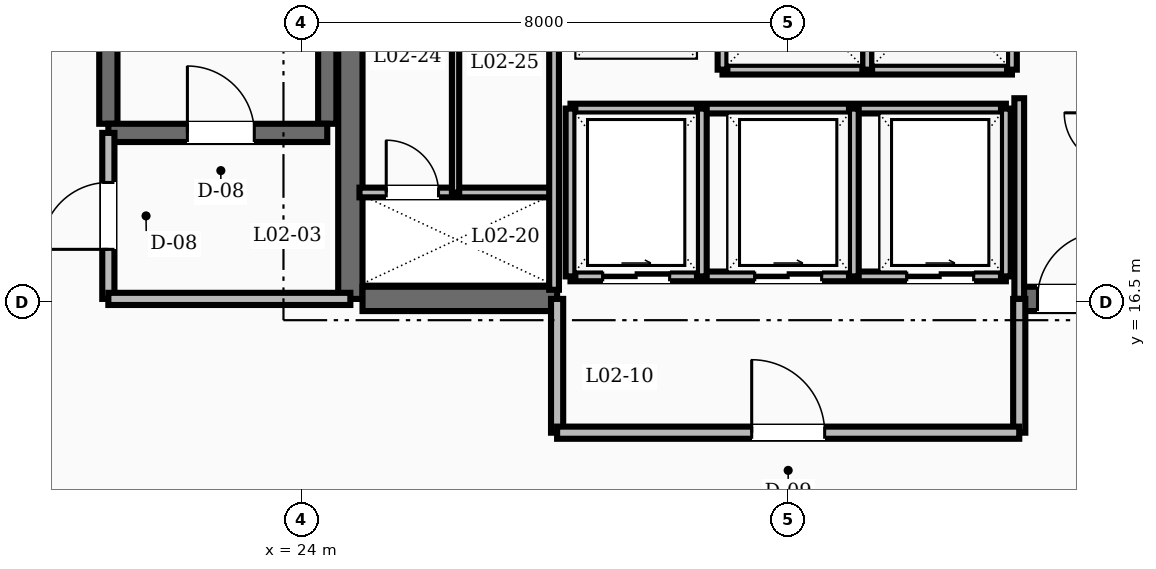
"""IFC4 building model, lengths in metres.
Left out: names, types, materials, properties, quantities, classifications, styles, units other than length and angle.
Written with IfcOpenShell. Run it as: python <this file> out.ifc"""

import sys

from ifc_helpers import new_model, si_unit, direction, frame, frame_2d, origin, place, context, subcontext, project, spatial, rectangle, extrude, element, fill, save


model = new_model("IFC4")
c1 = context("Model", 3, precision=1e-05, world=origin(), true_north=direction((0.0, 1.0)))
c2 = subcontext(c1, "Body", "Model", "MODEL_VIEW")
j1 = project(units=[si_unit("LENGTHUNIT", "METRE"), si_unit("PLANEANGLEUNIT", "RADIAN")], contexts=[c1])
p1 = place(None, origin())
s1 = spatial("IfcSite", under=j1, at=p1, CompositionType="ELEMENT")
p2 = place(p1, origin())
s2 = spatial("IfcBuilding", under=s1, at=p2, CompositionType="ELEMENT")
p3 = place(p2, frame((0.0, 0.0, 10.0)))
s3 = spatial("IfcBuildingStorey", under=s2, at=p3, CompositionType="ELEMENT", Elevation=10.0)
p4 = place(p3, frame((24.8, 16.55, 0.0), z_axis=(0.0, 0.0, 1.0), x_axis=(0.0, 1.0, 0.0)))
e1 = element("IfcWall", 1, at=p4, inside=s3, PredefinedType="SHEAR", context=c2, shape_type="SweptSolid", body=[
    extrude(rectangle(XDim=6.3, YDim=0.4, at=frame_2d((3.15, 0.0))), origin(), (0.0, 0.0, 1.0), 4.8),
])
p5 = place(p3, frame((25.0, 16.55, 0.0), z_axis=(0.0, 0.0, 1.0), x_axis=(1.0, 0.0, 0.0)))
e2 = element("IfcWall", 2, at=p5, inside=s3, PredefinedType="SHEAR", context=c2, shape_type="SweptSolid", body=[
    extrude(rectangle(XDim=3.2, YDim=0.4, at=frame_2d((1.6, 0.0))), origin(), (0.0, 0.0, 1.0), 4.8),
])
p6 = place(p3, frame((35.8, 16.55, 0.0), z_axis=(0.0, 0.0, 1.0), x_axis=(1.0, 0.0, 0.0)))
e3 = element("IfcWall", 3, at=p6, inside=s3, PredefinedType="SHEAR", context=c2, shape_type="SweptSolid", body=[
    extrude(rectangle(XDim=3.2, YDim=0.4, at=frame_2d((1.6, 0.0))), origin(), (0.0, 0.0, 1.0), 4.8),
])
p7 = place(p6, frame((0.3, 0.0, 0.0)))
e4 = element("IfcOpeningElement", 4, at=p7, cuts=e3, PredefinedType="OPENING", context=c2, shape_type="SweptSolid", body=[
    extrude(rectangle(XDim=1.1, YDim=2.1, at=frame_2d((0.55, 1.05))), frame((0.0, 0.21, 0.0), z_axis=(0.0, -1.0, 0.0), x_axis=(1.0, 0.0, 0.0)), (0.0, 0.0, 1.0), 0.42),
])
for number, where, z_axis, x_axis in (
    (5, (20.82, 19.43, 0.0), (0.0, 0.0, 1.0), (0.0, 1.0, 0.0)),
    (6, (24.42, 19.43, 0.0), (0.0, 0.0, 1.0), (0.0, 1.0, 0.0)),
):
    element("IfcWall", number, at=place(p3, frame(where, z_axis=z_axis, x_axis=x_axis)), inside=s3, PredefinedType="SHEAR", context=c2, shape_type="SweptSolid", body=[
        extrude(rectangle(XDim=8.74, YDim=0.3, at=frame_2d((4.37, 0.0))), origin(), (0.0, 0.0, 1.0), 4.8),
    ])
p8 = place(p3, frame((20.82, 19.28, 0.0), z_axis=(0.0, 0.0, 1.0), x_axis=(1.0, 0.0, 0.0)))
e7 = element("IfcWall", 7, at=p8, inside=s3, PredefinedType="SHEAR", context=c2, shape_type="SweptSolid", body=[
    extrude(rectangle(XDim=3.6, YDim=0.3, at=frame_2d((1.8, 0.0))), origin(), (0.0, 0.0, 1.0), 4.8),
])
p9 = place(p8, frame((1.3, 0.0, 0.0)))
e8 = element("IfcOpeningElement", 8, at=p9, cuts=e7, PredefinedType="OPENING", context=c2, shape_type="SweptSolid", body=[
    extrude(rectangle(XDim=1.1, YDim=2.1, at=frame_2d((0.55, 1.05))), frame((0.0, 0.16, 0.0), z_axis=(0.0, -1.0, 0.0), x_axis=(1.0, 0.0, 0.0)), (0.0, 0.0, 1.0), 0.32),
])
p10 = place(p3, frame((20.82, 16.55, 0.0), z_axis=(0.0, 0.0, 1.0), x_axis=(0.0, 1.0, 0.0)))
e9 = element("IfcWall", 9, at=p10, inside=s3, PredefinedType="SOLIDWALL", context=c2, shape_type="SweptSolid", body=[
    extrude(rectangle(XDim=2.73, YDim=0.2, at=frame_2d((1.365, 0.0))), origin(), (0.0, 0.0, 1.0), 3.52),
])
p11 = place(p10, frame((0.815, 0.0, 0.0)))
e10 = element("IfcOpeningElement", 10, at=p11, cuts=e9, PredefinedType="OPENING", context=c2, shape_type="SweptSolid", body=[
    extrude(rectangle(XDim=1.1, YDim=2.1, at=frame_2d((0.55, 1.05))), frame((0.0, 0.11, 0.0), z_axis=(0.0, -1.0, 0.0), x_axis=(1.0, 0.0, 0.0)), (0.0, 0.0, 1.0), 0.22),
])
p12 = place(p3, frame((20.82, 16.55, 0.0), z_axis=(0.0, 0.0, 1.0), x_axis=(1.0, 0.0, 0.0)))
e11 = element("IfcWall", 11, at=p12, inside=s3, PredefinedType="SOLIDWALL", context=c2, shape_type="SweptSolid", body=[
    extrude(rectangle(XDim=3.98, YDim=0.2, at=frame_2d((1.99, 0.0))), origin(), (0.0, 0.0, 1.0), 3.52),
])
p13 = place(p3, frame((35.8, 16.55, 0.0), z_axis=(0.0, 0.0, 1.0), x_axis=(0.0, 1.0, 0.0)))
e12 = element("IfcWall", 12, at=p13, inside=s3, PredefinedType="SOLIDWALL", context=c2, shape_type="SweptSolid", body=[
    extrude(rectangle(XDim=3.3, YDim=0.16, at=frame_2d((1.65, 0.0))), origin(), (0.0, 0.0, 1.0), 3.52),
])
for number, where, z_axis, x_axis in (
    (13, (28.2, 14.35, 0.0), (0.0, 0.0, 1.0), (0.0, 1.0, 0.0)),
    (14, (35.8, 14.35, 0.0), (0.0, 0.0, 1.0), (0.0, 1.0, 0.0)),
):
    element("IfcWall", number, at=place(p3, frame(where, z_axis=z_axis, x_axis=x_axis)), inside=s3, PredefinedType="SOLIDWALL", context=c2, shape_type="SweptSolid", body=[
        extrude(rectangle(XDim=2.2, YDim=0.2, at=frame_2d((1.1, 0.0))), origin(), (0.0, 0.0, 1.0), 3.52),
    ])
p14 = place(p3, frame((28.2, 14.35, 0.0), z_axis=(0.0, 0.0, 1.0), x_axis=(1.0, 0.0, 0.0)))
e15 = element("IfcWall", 15, at=p14, inside=s3, PredefinedType="SOLIDWALL", context=c2, shape_type="SweptSolid", body=[
    extrude(rectangle(XDim=7.6, YDim=0.2, at=frame_2d((3.8, 0.0))), origin(), (0.0, 0.0, 1.0), 3.52),
])
p15 = place(p14, frame((3.2, 0.0, 0.0)))
e16 = element("IfcOpeningElement", 16, at=p15, cuts=e15, PredefinedType="OPENING", context=c2, shape_type="SweptSolid", body=[
    extrude(rectangle(XDim=1.2, YDim=2.1, at=frame_2d((0.6, 1.05))), frame((0.0, 0.11, 0.0), z_axis=(0.0, -1.0, 0.0), x_axis=(1.0, 0.0, 0.0)), (0.0, 0.0, 1.0), 0.22),
])
p16 = place(p3, frame((30.92, 20.32, 0.0), z_axis=(0.0, 0.0, 1.0), x_axis=(1.0, 0.0, 0.0)))
e17 = element("IfcWall", 17, at=p16, inside=s3, PredefinedType="SOLIDWALL", context=c2, shape_type="SweptSolid", body=[
    extrude(rectangle(XDim=4.76, YDim=0.16, at=frame_2d((2.38, 0.0))), origin(), (0.0, 0.0, 1.0), 3.52),
])
for number, where, z_axis, x_axis in (
    (18, (30.92, 20.32, 0.0), (0.0, 0.0, 1.0), (0.0, 1.0, 0.0)),
    (19, (33.3, 20.32, 0.0), (0.0, 0.0, 1.0), (0.0, 1.0, 0.0)),
    (20, (35.68, 20.32, 0.0), (0.0, 0.0, 1.0), (0.0, 1.0, 0.0)),
):
    element("IfcWall", number, at=place(p3, frame(where, z_axis=z_axis, x_axis=x_axis)), inside=s3, PredefinedType="SOLIDWALL", context=c2, shape_type="SweptSolid", body=[
        extrude(rectangle(XDim=2.36, YDim=0.16, at=frame_2d((1.18, 0.0))), origin(), (0.0, 0.0, 1.0), 3.52),
    ])
p17 = place(p3, frame((28.42, 16.92, 0.0), z_axis=(0.0, 0.0, 1.0), x_axis=(1.0, 0.0, 0.0)))
e21 = element("IfcWall", 21, at=p17, inside=s3, PredefinedType="SOLIDWALL", context=c2, shape_type="SweptSolid", body=[
    extrude(rectangle(XDim=7.16, YDim=0.16, at=frame_2d((3.58, 0.0))), origin(), (0.0, 0.0, 1.0), 3.52),
])
p18 = place(p17, frame((0.53, 0.0, 0.0)))
e22 = element("IfcOpeningElement", 22, at=p18, cuts=e21, PredefinedType="OPENING", context=c2, shape_type="SweptSolid", body=[
    extrude(rectangle(XDim=1.1, YDim=2.15, at=frame_2d((0.55, 1.075))), frame((0.0, 0.09, 0.0), z_axis=(0.0, -1.0, 0.0), x_axis=(1.0, 0.0, 0.0)), (0.0, 0.0, 1.0), 0.18),
])
p19 = place(p17, frame((3.03, 0.0, 0.0)))
e23 = element("IfcOpeningElement", 23, at=p19, cuts=e21, PredefinedType="OPENING", context=c2, shape_type="SweptSolid", body=[
    extrude(rectangle(XDim=1.1, YDim=2.15, at=frame_2d((0.55, 1.075))), frame((0.0, 0.09, 0.0), z_axis=(0.0, -1.0, 0.0), x_axis=(1.0, 0.0, 0.0)), (0.0, 0.0, 1.0), 0.18),
])
p20 = place(p17, frame((5.53, 0.0, 0.0)))
e24 = element("IfcOpeningElement", 24, at=p20, cuts=e21, PredefinedType="OPENING", context=c2, shape_type="SweptSolid", body=[
    extrude(rectangle(XDim=1.1, YDim=2.15, at=frame_2d((0.55, 1.075))), frame((0.0, 0.09, 0.0), z_axis=(0.0, -1.0, 0.0), x_axis=(1.0, 0.0, 0.0)), (0.0, 0.0, 1.0), 0.18),
])
p21 = place(p3, frame((28.42, 19.68, 0.0), z_axis=(0.0, 0.0, 1.0), x_axis=(1.0, 0.0, 0.0)))
e25 = element("IfcWall", 25, at=p21, inside=s3, PredefinedType="SOLIDWALL", context=c2, shape_type="SweptSolid", body=[
    extrude(rectangle(XDim=7.16, YDim=0.16, at=frame_2d((3.58, 0.0))), origin(), (0.0, 0.0, 1.0), 3.52),
])
for number, where, z_axis, x_axis in (
    (26, (28.42, 16.92, 0.0), (0.0, 0.0, 1.0), (0.0, 1.0, 0.0)),
    (27, (30.58, 16.92, 0.0), (0.0, 0.0, 1.0), (0.0, 1.0, 0.0)),
    (28, (33.08, 16.92, 0.0), (0.0, 0.0, 1.0), (0.0, 1.0, 0.0)),
    (29, (35.58, 16.92, 0.0), (0.0, 0.0, 1.0), (0.0, 1.0, 0.0)),
):
    element("IfcWall", number, at=place(p3, frame(where, z_axis=z_axis, x_axis=x_axis)), inside=s3, PredefinedType="SOLIDWALL", context=c2, shape_type="SweptSolid", body=[
        extrude(rectangle(XDim=2.76, YDim=0.16, at=frame_2d((1.38, 0.0))), origin(), (0.0, 0.0, 1.0), 3.52),
    ])
p22 = place(p3, frame((24.95, 18.3, 0.0), z_axis=(0.0, 0.0, 1.0), x_axis=(1.0, 0.0, 0.0)))
e30 = element("IfcWall", 30, at=p22, inside=s3, PredefinedType="SOLIDWALL", context=c2, shape_type="SweptSolid", body=[
    extrude(rectangle(XDim=3.2, YDim=0.16, at=frame_2d((1.6, 0.0))), origin(), (0.0, 0.0, 1.0), 3.52),
])
p23 = place(p22, frame((0.44, 0.0, 0.0)))
e31 = element("IfcOpeningElement", 31, at=p23, cuts=e30, PredefinedType="OPENING", context=c2, shape_type="SweptSolid", body=[
    extrude(rectangle(XDim=0.86, YDim=2.05, at=frame_2d((0.43, 1.025))), frame((0.0, 0.09, 0.0), z_axis=(0.0, -1.0, 0.0), x_axis=(1.0, 0.0, 0.0)), (0.0, 0.0, 1.0), 0.18),
])
p24 = place(p3, frame((28.15, 16.7, 0.0), z_axis=(0.0, 0.0, 1.0), x_axis=(0.0, 1.0, 0.0)))
e32 = element("IfcWall", 32, at=p24, inside=s3, PredefinedType="SOLIDWALL", context=c2, shape_type="SweptSolid", body=[
    extrude(rectangle(XDim=6.05, YDim=0.16, at=frame_2d((3.025, 0.0))), origin(), (0.0, 0.0, 1.0), 3.52),
])
p25 = place(p3, frame((26.53, 18.3, 0.0), z_axis=(0.0, 0.0, 1.0), x_axis=(0.0, 1.0, 0.0)))
e33 = element("IfcWall", 33, at=p25, inside=s3, PredefinedType="PARTITIONING", context=c2, shape_type="SweptSolid", body=[
    extrude(rectangle(XDim=4.45, YDim=0.12, at=frame_2d((2.225, 0.0))), origin(), (0.0, 0.0, 1.0), 3.52),
])
p26 = place(p9, origin())
e34 = element("IfcDoor", 34, at=p26, inside=s3, OperationType="SINGLE_SWING_LEFT", PredefinedType="DOOR", context=c2, shape_type="SweptSolid", body=[
    extrude(rectangle(XDim=1.1, YDim=2.1, at=frame_2d((0.55, 1.05))), frame((0.0, 0.025, 0.0), z_axis=(0.0, -1.0, 0.0), x_axis=(1.0, 0.0, 0.0)), (0.0, 0.0, 1.0), 0.05),
])
fill(e8, e34)
p27 = place(p11, origin())
e35 = element("IfcDoor", 35, at=p27, inside=s3, OperationType="SINGLE_SWING_LEFT", PredefinedType="DOOR", context=c2, shape_type="SweptSolid", body=[
    extrude(rectangle(XDim=1.1, YDim=2.1, at=frame_2d((0.55, 1.05))), frame((0.0, 0.025, 0.0), z_axis=(0.0, -1.0, 0.0), x_axis=(1.0, 0.0, 0.0)), (0.0, 0.0, 1.0), 0.05),
])
fill(e10, e35)
p28 = place(p7, origin())
e36 = element("IfcDoor", 36, at=p28, inside=s3, OperationType="SINGLE_SWING_RIGHT", PredefinedType="DOOR", context=c2, shape_type="SweptSolid", body=[
    extrude(rectangle(XDim=1.1, YDim=2.1, at=frame_2d((0.55, 1.05))), frame((0.0, 0.025, 0.0), z_axis=(0.0, -1.0, 0.0), x_axis=(1.0, 0.0, 0.0)), (0.0, 0.0, 1.0), 0.05),
])
fill(e4, e36)
p29 = place(p15, origin())
e37 = element("IfcDoor", 37, at=p29, inside=s3, OperationType="SINGLE_SWING_LEFT", PredefinedType="DOOR", context=c2, shape_type="SweptSolid", body=[
    extrude(rectangle(XDim=1.2, YDim=2.1, at=frame_2d((0.6, 1.05))), frame((0.0, 0.025, 0.0), z_axis=(0.0, -1.0, 0.0), x_axis=(1.0, 0.0, 0.0)), (0.0, 0.0, 1.0), 0.05),
])
fill(e16, e37)
p30 = place(p18, origin())
e38 = element("IfcDoor", 38, at=p30, inside=s3, OperationType="SLIDING_TO_RIGHT", PredefinedType="DOOR", context=c2, shape_type="SweptSolid", body=[
    extrude(rectangle(XDim=1.1, YDim=2.15, at=frame_2d((0.55, 1.075))), frame((0.0, 0.025, 0.0), z_axis=(0.0, -1.0, 0.0), x_axis=(1.0, 0.0, 0.0)), (0.0, 0.0, 1.0), 0.05),
])
fill(e22, e38)
p31 = place(p19, origin())
e39 = element("IfcDoor", 39, at=p31, inside=s3, OperationType="SLIDING_TO_RIGHT", PredefinedType="DOOR", context=c2, shape_type="SweptSolid", body=[
    extrude(rectangle(XDim=1.1, YDim=2.15, at=frame_2d((0.55, 1.075))), frame((0.0, 0.025, 0.0), z_axis=(0.0, -1.0, 0.0), x_axis=(1.0, 0.0, 0.0)), (0.0, 0.0, 1.0), 0.05),
])
fill(e23, e39)
p32 = place(p20, origin())
e40 = element("IfcDoor", 40, at=p32, inside=s3, OperationType="SLIDING_TO_RIGHT", PredefinedType="DOOR", context=c2, shape_type="SweptSolid", body=[
    extrude(rectangle(XDim=1.1, YDim=2.15, at=frame_2d((0.55, 1.075))), frame((0.0, 0.025, 0.0), z_axis=(0.0, -1.0, 0.0), x_axis=(1.0, 0.0, 0.0)), (0.0, 0.0, 1.0), 0.05),
])
fill(e24, e40)
p33 = place(p23, origin())
e41 = element("IfcDoor", 41, at=p33, inside=s3, OperationType="SINGLE_SWING_LEFT", PredefinedType="TRAPDOOR", context=c2, shape_type="SweptSolid", body=[
    extrude(rectangle(XDim=0.86, YDim=2.05, at=frame_2d((0.43, 1.025))), frame((0.0, 0.025, 0.0), z_axis=(0.0, -1.0, 0.0), x_axis=(1.0, 0.0, 0.0)), (0.0, 0.0, 1.0), 0.05),
])
fill(e31, e41)
save(model, sys.argv[1])
